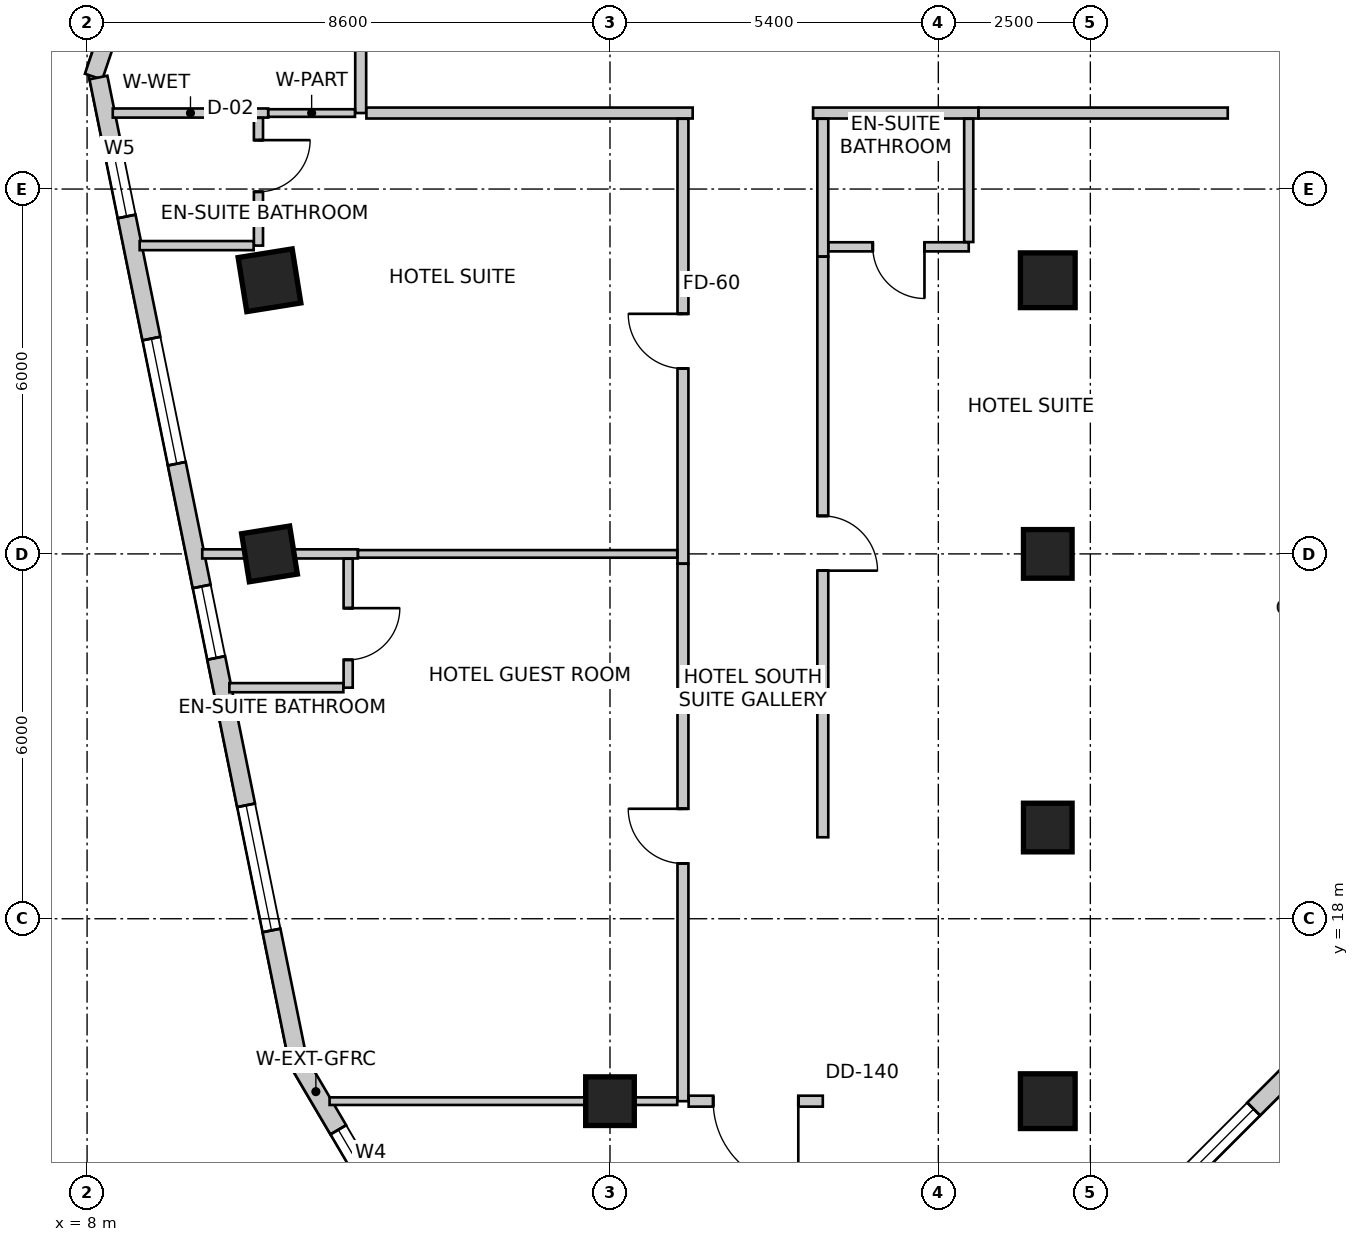
"""IFC4 building model, lengths in metres.
Left out: names, types, materials, properties, quantities, classifications, styles, units other than length and angle.
Written with IfcOpenShell. Run it as: python <this file> out.ifc"""

import sys

from ifc_helpers import new_model, si_unit, direction, frame, frame_2d, origin, origin_2d, place, context, subcontext, project, spatial, rectangle, extrude, source, transform, mapped, element, fill, save


model = new_model("IFC4")
c1 = context("Model", 3, precision=1e-05, world=origin(), true_north=direction((0.0, 1.0)))
c2 = subcontext(c1, "Body", "Model", "MODEL_VIEW")
j1 = project(units=[si_unit("LENGTHUNIT", "METRE"), si_unit("PLANEANGLEUNIT", "RADIAN")], contexts=[c1])
p1 = place(None, origin())
s1 = spatial("IfcSite", under=j1, at=p1, CompositionType="ELEMENT")
p2 = place(p1, origin())
s2 = spatial("IfcBuilding", under=s1, at=p2, CompositionType="ELEMENT")
p3 = place(p2, frame((0.0, 0.0, 139.4)))
s3 = spatial("IfcBuildingStorey", under=s2, at=p3, CompositionType="ELEMENT", Elevation=139.4)
m1 = source(origin(), c2, "Body", "SweptSolid", [
    extrude(rectangle(XDim=0.9, YDim=0.9, at=origin_2d()), origin(), (0.0, 0.0, 1.0), 3.6),
])
p4 = place(p3, frame((11.0, 28.5, 0.0), z_axis=(0.0, 0.0, 1.0), x_axis=(0.158158067254, -0.987413806751, 0.0)))
e1 = element("IfcColumn", 1, at=p4, inside=s3, PredefinedType="COLUMN", context=c2, shape_type="MappedRepresentation", body=[
    mapped(m1, transform((0.0, 0.0, 0.0), scale=1.0)),
])
m2 = source(origin(), c2, "Body", "SweptSolid", [
    extrude(rectangle(XDim=0.8, YDim=0.8, at=origin_2d()), origin(), (0.0, 0.0, 1.0), 3.6),
])
p5 = place(p3, frame((11.0, 24.0, 0.0), z_axis=(0.0, 0.0, 1.0), x_axis=(0.158158067254, -0.987413806751, 0.0)))
e2 = element("IfcColumn", 2, at=p5, inside=s3, PredefinedType="COLUMN", context=c2, shape_type="MappedRepresentation", body=[
    mapped(m2, transform((0.0, 0.0, 0.0), scale=1.0)),
])
p6 = place(p3, frame((23.8, 28.5, 0.0), z_axis=(0.0, 0.0, 1.0), x_axis=(1.0, 0.0, 0.0)))
e3 = element("IfcColumn", 3, at=p6, inside=s3, PredefinedType="COLUMN", context=c2, shape_type="MappedRepresentation", body=[
    mapped(m1, transform((0.0, 0.0, 0.0), scale=1.0)),
])
for number, where, z_axis, x_axis in (
    (4, (23.8, 24.0, 0.0), (0.0, 0.0, 1.0), (1.0, 0.0, 0.0)),
    (5, (23.8, 19.5, 0.0), (0.0, 0.0, 1.0), (1.0, 0.0, 0.0)),
):
    element("IfcColumn", number, at=place(p3, frame(where, z_axis=z_axis, x_axis=x_axis)), inside=s3, PredefinedType="COLUMN", context=c2, shape_type="MappedRepresentation", body=[
        mapped(m2, transform((0.0, 0.0, 0.0), scale=1.0)),
    ])
p7 = place(p3, frame((23.8, 15.0, 0.0), z_axis=(0.0, 0.0, 1.0), x_axis=(1.0, 0.0, 0.0)))
e6 = element("IfcColumn", 6, at=p7, inside=s3, PredefinedType="COLUMN", context=c2, shape_type="MappedRepresentation", body=[
    mapped(m1, transform((0.0, 0.0, 0.0), scale=1.0)),
])
p8 = place(p3, frame((16.6, 15.0, 0.0), z_axis=(0.0, 0.0, 1.0), x_axis=(1.0, 0.0, 0.0)))
e7 = element("IfcColumn", 7, at=p8, inside=s3, PredefinedType="COLUMN", context=c2, shape_type="MappedRepresentation", body=[
    mapped(m2, transform((0.0, 0.0, 0.0), scale=1.0)),
])
p9 = place(p3, frame((11.394, 15.784, 0.0), z_axis=(0.0, 0.0, 1.0), x_axis=(0.50698915279, -0.861952434275, 0.0)))
e8 = element("IfcWall", 8, at=p9, inside=s3, PredefinedType="SOLIDWALL", context=c2, shape_type="SweptSolid", body=[
    extrude(rectangle(XDim=4.134, YDim=0.3, at=frame_2d((2.067, 0.0))), origin(), (0.0, 0.0, 1.0), 3.35),
])
m3 = source(origin(), c2, "Body", "SweptSolid", [
    extrude(rectangle(XDim=2.1, YDim=2.0, at=frame_2d((1.05, 1.0))), frame((0.0, 0.16, 0.0), z_axis=(0.0, -1.0, 0.0), x_axis=(1.0, 0.0, 0.0)), (0.0, 0.0, 1.0), 0.32),
])
p10 = place(p9, frame((1.455, 0.0, 0.85)))
e9 = element("IfcOpeningElement", 9, at=p10, cuts=e8, PredefinedType="OPENING", context=c2, shape_type="MappedRepresentation", body=[
    mapped(m3, transform((0.0, 0.0, 0.0), scale=1.0)),
])
p11 = place(p3, frame((24.804, 12.488, 0.0), z_axis=(0.0, 0.0, 1.0), x_axis=(0.70708046583, 0.707133095564, 0.0)))
e10 = element("IfcWall", 10, at=p11, inside=s3, PredefinedType="SOLIDWALL", context=c2, shape_type="SweptSolid", body=[
    extrude(rectangle(XDim=4.639, YDim=0.3, at=frame_2d((2.319, 0.0))), origin(), (0.0, 0.0, 1.0), 3.35),
])
p12 = place(p11, frame((1.269, 0.0, 0.85)))
e11 = element("IfcOpeningElement", 11, at=p12, cuts=e10, PredefinedType="OPENING", context=c2, shape_type="MappedRepresentation", body=[
    mapped(m3, transform((0.0, 0.0, 0.0), scale=1.0)),
])
p13 = place(p3, frame((13.269, 47.134, 0.0), z_axis=(0.0, 0.0, 1.0), x_axis=(-0.319929773322, -0.947441259468, 0.0)))
e12 = element("IfcWall", 12, at=p13, inside=s3, PredefinedType="SOLIDWALL", context=c2, shape_type="SweptSolid", body=[
    extrude(rectangle(XDim=16.134, YDim=0.3, at=frame_2d((8.067, 0.0))), origin(), (0.0, 0.0, 1.0), 3.35),
])
m4 = source(origin(), c2, "Body", "SweptSolid", [
    extrude(rectangle(XDim=2.4, YDim=2.2, at=frame_2d((1.2, 1.1))), frame((0.0, 0.16, 0.0), z_axis=(0.0, -1.0, 0.0), x_axis=(1.0, 0.0, 0.0)), (0.0, 0.0, 1.0), 0.32),
])
p14 = place(p13, frame((2.276, 0.0, 0.85)))
e13 = element("IfcOpeningElement", 13, at=p14, cuts=e12, PredefinedType="OPENING", context=c2, shape_type="MappedRepresentation", body=[
    mapped(m4, transform((0.0, 0.0, 0.0), scale=1.0)),
])
p15 = place(p13, frame((7.361, 0.0, 0.85)))
e14 = element("IfcOpeningElement", 14, at=p15, cuts=e12, PredefinedType="OPENING", context=c2, shape_type="MappedRepresentation", body=[
    mapped(m3, transform((0.0, 0.0, 0.0), scale=1.0)),
])
p16 = place(p13, frame((12.146, 0.0, 0.85)))
e15 = element("IfcOpeningElement", 15, at=p16, cuts=e12, PredefinedType="OPENING", context=c2, shape_type="MappedRepresentation", body=[
    mapped(m4, transform((0.0, 0.0, 0.0), scale=1.0)),
])
p17 = place(p3, frame((8.187, 31.834, 0.0), z_axis=(0.0, 0.0, 1.0), x_axis=(0.198869838988, -0.980025911464, 0.0)))
e16 = element("IfcWall", 16, at=p17, inside=s3, PredefinedType="SOLIDWALL", context=c2, shape_type="SweptSolid", body=[
    extrude(rectangle(XDim=16.363, YDim=0.3, at=frame_2d((8.182, 0.0))), origin(), (0.0, 0.0, 1.0), 3.35),
])
m5 = source(origin(), c2, "Body", "SweptSolid", [
    extrude(rectangle(XDim=1.2, YDim=1.6, at=frame_2d((0.6, 0.8))), frame((0.0, 0.16, 0.0), z_axis=(0.0, -1.0, 0.0), x_axis=(1.0, 0.0, 0.0)), (0.0, 0.0, 1.0), 0.32),
])
p18 = place(p17, frame((1.131, 0.0, 0.85)))
e17 = element("IfcOpeningElement", 17, at=p18, cuts=e16, PredefinedType="OPENING", context=c2, shape_type="MappedRepresentation", body=[
    mapped(m5, transform((0.0, 0.0, 0.0), scale=1.0)),
])
p19 = place(p17, frame((4.38, 0.0, 0.85)))
e18 = element("IfcOpeningElement", 18, at=p19, cuts=e16, PredefinedType="OPENING", context=c2, shape_type="MappedRepresentation", body=[
    mapped(m3, transform((0.0, 0.0, 0.0), scale=1.0)),
])
p20 = place(p17, frame((8.539, 0.0, 0.85)))
e19 = element("IfcOpeningElement", 19, at=p20, cuts=e16, PredefinedType="OPENING", context=c2, shape_type="MappedRepresentation", body=[
    mapped(m5, transform((0.0, 0.0, 0.0), scale=1.0)),
])
p21 = place(p17, frame((12.212, 0.0, 0.85)))
e20 = element("IfcOpeningElement", 20, at=p21, cuts=e16, PredefinedType="OPENING", context=c2, shape_type="MappedRepresentation", body=[
    mapped(m3, transform((0.0, 0.0, 0.0), scale=1.0)),
])
p22 = place(p3, frame((12.5, 31.25, 0.0), z_axis=(0.0, 0.0, 1.0), x_axis=(0.0, 1.0, 0.0)))
e21 = element("IfcWall", 21, at=p22, inside=s3, PredefinedType="PARTITIONING", context=c2, shape_type="SweptSolid", body=[
    extrude(rectangle(XDim=2.2, YDim=0.18, at=frame_2d((1.1, 0.0))), origin(), (0.0, 0.0, 1.0), 3.019),
])
p23 = place(p3, frame((17.96, 31.25, 0.0), z_axis=(0.0, 0.0, 1.0), x_axis=(-1.0, 0.0, 0.0)))
e22 = element("IfcWall", 22, at=p23, inside=s3, PredefinedType="PARTITIONING", context=c2, shape_type="SweptSolid", body=[
    extrude(rectangle(XDim=5.366, YDim=0.18, at=frame_2d((2.683, 0.0))), origin(), (0.0, 0.0, 1.0), 3.019),
])
p24 = place(p3, frame((22.66, 31.25, 0.0), z_axis=(0.0, 0.0, 1.0), x_axis=(-1.0, 0.0, 0.0)))
e23 = element("IfcWall", 23, at=p24, inside=s3, PredefinedType="PARTITIONING", context=c2, shape_type="SweptSolid", body=[
    extrude(rectangle(XDim=2.72, YDim=0.18, at=frame_2d((1.36, 0.0))), origin(), (0.0, 0.0, 1.0), 3.019),
])
p25 = place(p3, frame((26.76, 31.25, 0.0), z_axis=(0.0, 0.0, 1.0), x_axis=(-1.0, 0.0, 0.0)))
e24 = element("IfcWall", 24, at=p25, inside=s3, PredefinedType="PARTITIONING", context=c2, shape_type="SweptSolid", body=[
    extrude(rectangle(XDim=4.098, YDim=0.18, at=frame_2d((2.049, 0.0))), origin(), (0.0, 0.0, 1.0), 3.35),
])
p26 = place(p3, frame((10.979, 31.25, 0.0), z_axis=(0.0, 0.0, 1.0), x_axis=(-1.0, 0.0, 0.0)))
e25 = element("IfcWall", 25, at=p26, inside=s3, PredefinedType="PARTITIONING", context=c2, shape_type="SweptSolid", body=[
    extrude(rectangle(XDim=2.556, YDim=0.15, at=frame_2d((1.278, 0.0))), origin(), (0.0, 0.0, 1.0), 2.492),
])
p27 = place(p3, frame((12.406, 31.25, 0.0), z_axis=(0.0, 0.0, 1.0), x_axis=(-1.0, 0.0, 0.0)))
e26 = element("IfcWall", 26, at=p27, inside=s3, PredefinedType="PARTITIONING", context=c2, shape_type="SweptSolid", body=[
    extrude(rectangle(XDim=1.426, YDim=0.125, at=frame_2d((0.713, 0.0))), origin(), (0.0, 0.0, 1.0), 2.492),
])
p28 = place(p3, frame((17.8, 23.84, 0.0), z_axis=(0.0, 0.0, 1.0), x_axis=(0.0, 1.0, 0.0)))
e27 = element("IfcWall", 27, at=p28, inside=s3, PredefinedType="PARTITIONING", context=c2, shape_type="SweptSolid", body=[
    extrude(rectangle(XDim=7.316, YDim=0.18, at=frame_2d((3.658, 0.0))), origin(), (0.0, 0.0, 1.0), 2.803),
])
m6 = source(origin(), c2, "Body", "SweptSolid", [
    extrude(rectangle(XDim=0.9, YDim=2.15, at=frame_2d((0.45, 1.075))), frame((0.0, 0.1, 0.0), z_axis=(0.0, -1.0, 0.0), x_axis=(1.0, 0.0, 0.0)), (0.0, 0.0, 1.0), 0.2),
])
p29 = place(p28, frame((3.208, 0.0, 0.0)))
e28 = element("IfcOpeningElement", 28, at=p29, cuts=e27, PredefinedType="OPENING", context=c2, shape_type="MappedRepresentation", body=[
    mapped(m6, transform((0.0, 0.0, 0.0), scale=1.0)),
])
p30 = place(p3, frame((17.8, 15.0, 0.0), z_axis=(0.0, 0.0, 1.0), x_axis=(0.0, 1.0, 0.0)))
e29 = element("IfcWall", 29, at=p30, inside=s3, PredefinedType="PARTITIONING", context=c2, shape_type="SweptSolid", body=[
    extrude(rectangle(XDim=8.838, YDim=0.18, at=frame_2d((4.419, 0.0))), origin(), (0.0, 0.0, 1.0), 2.492),
])
p31 = place(p30, frame((3.908, 0.0, 0.0)))
e30 = element("IfcOpeningElement", 30, at=p31, cuts=e29, PredefinedType="OPENING", context=c2, shape_type="MappedRepresentation", body=[
    mapped(m6, transform((0.0, 0.0, 0.0), scale=1.0)),
])
p32 = place(p3, frame((20.1, 31.156, 0.0), z_axis=(0.0, 0.0, 1.0), x_axis=(0.0, -1.0, 0.0)))
e31 = element("IfcWall", 31, at=p32, inside=s3, PredefinedType="PARTITIONING", context=c2, shape_type="SweptSolid", body=[
    extrude(rectangle(XDim=2.266, YDim=0.18, at=frame_2d((1.133, 0.0))), origin(), (0.0, 0.0, 1.0), 3.019),
])
p33 = place(p3, frame((20.1, 28.888, 0.0), z_axis=(0.0, 0.0, 1.0), x_axis=(0.0, -1.0, 0.0)))
e32 = element("IfcWall", 32, at=p33, inside=s3, PredefinedType="PARTITIONING", context=c2, shape_type="SweptSolid", body=[
    extrude(rectangle(XDim=9.548, YDim=0.18, at=frame_2d((4.774, 0.0))), origin(), (0.0, 0.0, 1.0), 2.803),
])
p34 = place(p33, frame((4.264, 0.0, 0.0)))
e33 = element("IfcOpeningElement", 33, at=p34, cuts=e32, PredefinedType="OPENING", context=c2, shape_type="MappedRepresentation", body=[
    mapped(m6, transform((0.0, 0.0, 0.0), scale=1.0)),
])
p35 = place(p3, frame((20.1, 15.0, 0.0), z_axis=(0.0, 0.0, 1.0), x_axis=(-1.0, 0.0, 0.0)))
e34 = element("IfcWall", 34, at=p35, inside=s3, PredefinedType="PARTITIONING", context=c2, shape_type="SweptSolid", body=[
    extrude(rectangle(XDim=2.206, YDim=0.18, at=frame_2d((1.103, 0.0))), origin(), (0.0, 0.0, 1.0), 2.492),
])
m7 = source(origin(), c2, "Body", "SweptSolid", [
    extrude(rectangle(XDim=1.4, YDim=2.15, at=frame_2d((0.7, 1.075))), frame((0.0, 0.1, 0.0), z_axis=(0.0, -1.0, 0.0), x_axis=(1.0, 0.0, 0.0)), (0.0, 0.0, 1.0), 0.2),
])
p36 = place(p35, frame((0.403, 0.0, 0.0)))
e35 = element("IfcOpeningElement", 35, at=p36, cuts=e34, PredefinedType="OPENING", context=c2, shape_type="MappedRepresentation", body=[
    mapped(m7, transform((0.0, 0.0, 0.0), scale=1.0)),
])
p37 = place(p3, frame((10.819, 31.171, 0.0), z_axis=(0.0, 0.0, 1.0), x_axis=(0.0, -1.0, 0.0)))
e36 = element("IfcWall", 36, at=p37, inside=s3, PredefinedType="PARTITIONING", context=c2, shape_type="SweptSolid", body=[
    extrude(rectangle(XDim=2.101, YDim=0.15, at=frame_2d((1.05, 0.0))), origin(), (0.0, 0.0, 1.0), 2.492),
])
m8 = source(origin(), c2, "Body", "SweptSolid", [
    extrude(rectangle(XDim=0.85, YDim=2.15, at=frame_2d((0.425, 1.075))), frame((0.0, 0.085, 0.0), z_axis=(0.0, -1.0, 0.0), x_axis=(1.0, 0.0, 0.0)), (0.0, 0.0, 1.0), 0.17),
])
p38 = place(p37, frame((0.366, 0.0, 0.0)))
e37 = element("IfcOpeningElement", 37, at=p38, cuts=e36, PredefinedType="OPENING", context=c2, shape_type="MappedRepresentation", body=[
    mapped(m8, transform((0.0, 0.0, 0.0), scale=1.0)),
])
p39 = place(p3, frame((10.74, 29.07, 0.0), z_axis=(0.0, 0.0, 1.0), x_axis=(-1.0, 0.0, 0.0)))
e38 = element("IfcWall", 38, at=p39, inside=s3, PredefinedType="PARTITIONING", context=c2, shape_type="SweptSolid", body=[
    extrude(rectangle(XDim=1.875, YDim=0.15, at=frame_2d((0.937, 0.0))), origin(), (0.0, 0.0, 1.0), 3.35),
])
p40 = place(p3, frame((12.454, 24.0, 0.0), z_axis=(0.0, 0.0, 1.0), x_axis=(-1.0, 0.0, 0.0)))
e39 = element("IfcWall", 39, at=p40, inside=s3, PredefinedType="PARTITIONING", context=c2, shape_type="SweptSolid", body=[
    extrude(rectangle(XDim=2.56, YDim=0.15, at=frame_2d((1.28, 0.0))), origin(), (0.0, 0.0, 1.0), 2.492),
])
p41 = place(p3, frame((17.706, 24.0, 0.0), z_axis=(0.0, 0.0, 1.0), x_axis=(-1.0, 0.0, 0.0)))
e40 = element("IfcWall", 40, at=p41, inside=s3, PredefinedType="PARTITIONING", context=c2, shape_type="SweptSolid", body=[
    extrude(rectangle(XDim=5.25, YDim=0.125, at=frame_2d((2.625, 0.0))), origin(), (0.0, 0.0, 1.0), 2.803),
])
p42 = place(p3, frame((12.294, 23.921, 0.0), z_axis=(0.0, 0.0, 1.0), x_axis=(0.0, -1.0, 0.0)))
e41 = element("IfcWall", 41, at=p42, inside=s3, PredefinedType="PARTITIONING", context=c2, shape_type="SweptSolid", body=[
    extrude(rectangle(XDim=2.121, YDim=0.15, at=frame_2d((1.061, 0.0))), origin(), (0.0, 0.0, 1.0), 2.879),
])
p43 = place(p42, frame((0.813, 0.0, 0.0)))
e42 = element("IfcOpeningElement", 42, at=p43, cuts=e41, PredefinedType="OPENING", context=c2, shape_type="MappedRepresentation", body=[
    mapped(m8, transform((0.0, 0.0, 0.0), scale=1.0)),
])
p44 = place(p3, frame((12.215, 21.8, 0.0), z_axis=(0.0, 0.0, 1.0), x_axis=(-1.0, 0.0, 0.0)))
e43 = element("IfcWall", 43, at=p44, inside=s3, PredefinedType="PARTITIONING", context=c2, shape_type="SweptSolid", body=[
    extrude(rectangle(XDim=1.875, YDim=0.15, at=frame_2d((0.937, 0.0))), origin(), (0.0, 0.0, 1.0), 3.35),
])
p45 = place(p3, frame((17.706, 15.0, 0.0), z_axis=(0.0, 0.0, 1.0), x_axis=(-1.0, 0.0, 0.0)))
e44 = element("IfcWall", 44, at=p45, inside=s3, PredefinedType="PARTITIONING", context=c2, shape_type="SweptSolid", body=[
    extrude(rectangle(XDim=5.718, YDim=0.125, at=frame_2d((2.859, 0.0))), origin(), (0.0, 0.0, 1.0), 2.492),
])
p46 = place(p3, frame((22.5, 29.05, 0.0), z_axis=(0.0, 0.0, 1.0), x_axis=(-1.0, 0.0, 0.0)))
e45 = element("IfcWall", 45, at=p46, inside=s3, PredefinedType="PARTITIONING", context=c2, shape_type="SweptSolid", body=[
    extrude(rectangle(XDim=2.306, YDim=0.15, at=frame_2d((1.153, 0.0))), origin(), (0.0, 0.0, 1.0), 3.019),
])
p47 = place(p46, frame((0.728, 0.0, 0.0)))
e46 = element("IfcOpeningElement", 46, at=p47, cuts=e45, PredefinedType="OPENING", context=c2, shape_type="MappedRepresentation", body=[
    mapped(m8, transform((0.0, 0.0, 0.0), scale=1.0)),
])
p48 = place(p3, frame((22.5, 31.156, 0.0), z_axis=(0.0, 0.0, 1.0), x_axis=(0.0, -1.0, 0.0)))
e47 = element("IfcWall", 47, at=p48, inside=s3, PredefinedType="PARTITIONING", context=c2, shape_type="SweptSolid", body=[
    extrude(rectangle(XDim=2.027, YDim=0.15, at=frame_2d((1.014, 0.0))), origin(), (0.0, 0.0, 1.0), 3.019),
])
m9 = source(origin(), c2, "Body", "SweptSolid", [
    extrude(rectangle(XDim=2.1, YDim=2.0, at=frame_2d((1.05, 1.0))), frame((0.0, -0.015, 0.0), z_axis=(0.0, -1.0, 0.0), x_axis=(1.0, 0.0, 0.0)), (0.0, 0.0, 1.0), 0.06),
])
p49 = place(p10, origin())
e48 = element("IfcWindow", 48, at=p49, inside=s3, PartitioningType="SINGLE_PANEL", PredefinedType="WINDOW", context=c2, shape_type="MappedRepresentation", body=[
    mapped(m9, transform((0.0, 0.0, 0.0), scale=1.0)),
])
fill(e9, e48)
p50 = place(p12, origin())
e49 = element("IfcWindow", 49, at=p50, inside=s3, PartitioningType="SINGLE_PANEL", PredefinedType="WINDOW", context=c2, shape_type="MappedRepresentation", body=[
    mapped(m9, transform((0.0, 0.0, 0.0), scale=1.0)),
])
fill(e11, e49)
m10 = source(origin(), c2, "Body", "SweptSolid", [
    extrude(rectangle(XDim=1.2, YDim=1.6, at=frame_2d((0.6, 0.8))), frame((0.0, -0.015, 0.0), z_axis=(0.0, -1.0, 0.0), x_axis=(1.0, 0.0, 0.0)), (0.0, 0.0, 1.0), 0.06),
])
p51 = place(p18, origin())
e50 = element("IfcWindow", 50, at=p51, inside=s3, PartitioningType="SINGLE_PANEL", PredefinedType="WINDOW", context=c2, shape_type="MappedRepresentation", body=[
    mapped(m10, transform((0.0, 0.0, 0.0), scale=1.0)),
])
fill(e17, e50)
p52 = place(p19, origin())
e51 = element("IfcWindow", 51, at=p52, inside=s3, PartitioningType="SINGLE_PANEL", PredefinedType="WINDOW", context=c2, shape_type="MappedRepresentation", body=[
    mapped(m9, transform((0.0, 0.0, 0.0), scale=1.0)),
])
fill(e18, e51)
p53 = place(p20, origin())
e52 = element("IfcWindow", 52, at=p53, inside=s3, PartitioningType="SINGLE_PANEL", PredefinedType="WINDOW", context=c2, shape_type="MappedRepresentation", body=[
    mapped(m10, transform((0.0, 0.0, 0.0), scale=1.0)),
])
fill(e19, e52)
p54 = place(p21, origin())
e53 = element("IfcWindow", 53, at=p54, inside=s3, PartitioningType="SINGLE_PANEL", PredefinedType="WINDOW", context=c2, shape_type="MappedRepresentation", body=[
    mapped(m9, transform((0.0, 0.0, 0.0), scale=1.0)),
])
fill(e20, e53)
m11 = source(origin(), c2, "Body", "SweptSolid", [
    extrude(rectangle(XDim=0.85, YDim=2.15, at=frame_2d((0.425, 1.075))), frame((0.0, 0.025, 0.0), z_axis=(0.0, -1.0, 0.0), x_axis=(1.0, 0.0, 0.0)), (0.0, 0.0, 1.0), 0.05),
])
p55 = place(p38, origin())
e54 = element("IfcDoor", 54, at=p55, inside=s3, OperationType="SINGLE_SWING_LEFT", PredefinedType="DOOR", context=c2, shape_type="MappedRepresentation", body=[
    mapped(m11, transform((0.0, 0.0, 0.0), scale=1.0)),
])
fill(e37, e54)
m12 = source(origin(), c2, "Body", "SweptSolid", [
    extrude(rectangle(XDim=0.9, YDim=2.15, at=frame_2d((0.45, 1.075))), frame((0.0, 0.025, 0.0), z_axis=(0.0, -1.0, 0.0), x_axis=(1.0, 0.0, 0.0)), (0.0, 0.0, 1.0), 0.05),
])
p56 = place(p29, origin())
e55 = element("IfcDoor", 55, at=p56, inside=s3, OperationType="SINGLE_SWING_RIGHT", PredefinedType="DOOR", context=c2, shape_type="MappedRepresentation", body=[
    mapped(m12, transform((0.0, 0.0, 0.0), scale=1.0)),
])
fill(e28, e55)
p57 = place(p43, origin())
e56 = element("IfcDoor", 56, at=p57, inside=s3, OperationType="SINGLE_SWING_LEFT", PredefinedType="DOOR", context=c2, shape_type="MappedRepresentation", body=[
    mapped(m11, transform((0.0, 0.0, 0.0), scale=1.0)),
])
fill(e42, e56)
p58 = place(p31, origin())
e57 = element("IfcDoor", 57, at=p58, inside=s3, OperationType="SINGLE_SWING_RIGHT", PredefinedType="DOOR", context=c2, shape_type="MappedRepresentation", body=[
    mapped(m12, transform((0.0, 0.0, 0.0), scale=1.0)),
])
fill(e30, e57)
p59 = place(p47, origin())
e58 = element("IfcDoor", 58, at=p59, inside=s3, OperationType="SINGLE_SWING_LEFT", PredefinedType="DOOR", context=c2, shape_type="MappedRepresentation", body=[
    mapped(m11, transform((0.0, 0.0, 0.0), scale=1.0)),
])
fill(e46, e58)
p60 = place(p34, origin())
e59 = element("IfcDoor", 59, at=p60, inside=s3, OperationType="SINGLE_SWING_RIGHT", PredefinedType="DOOR", context=c2, shape_type="MappedRepresentation", body=[
    mapped(m12, transform((0.0, 0.0, 0.0), scale=1.0)),
])
fill(e33, e59)
m13 = source(origin(), c2, "Body", "SweptSolid", [
    extrude(rectangle(XDim=1.4, YDim=2.15, at=frame_2d((0.7, 1.075))), frame((0.0, 0.025, 0.0), z_axis=(0.0, -1.0, 0.0), x_axis=(1.0, 0.0, 0.0)), (0.0, 0.0, 1.0), 0.05),
])
p61 = place(p36, origin())
e60 = element("IfcDoor", 60, at=p61, inside=s3, OperationType="SINGLE_SWING_LEFT", PredefinedType="DOOR", context=c2, shape_type="MappedRepresentation", body=[
    mapped(m13, transform((0.0, 0.0, 0.0), scale=1.0)),
])
fill(e35, e60)
save(model, sys.argv[1])
